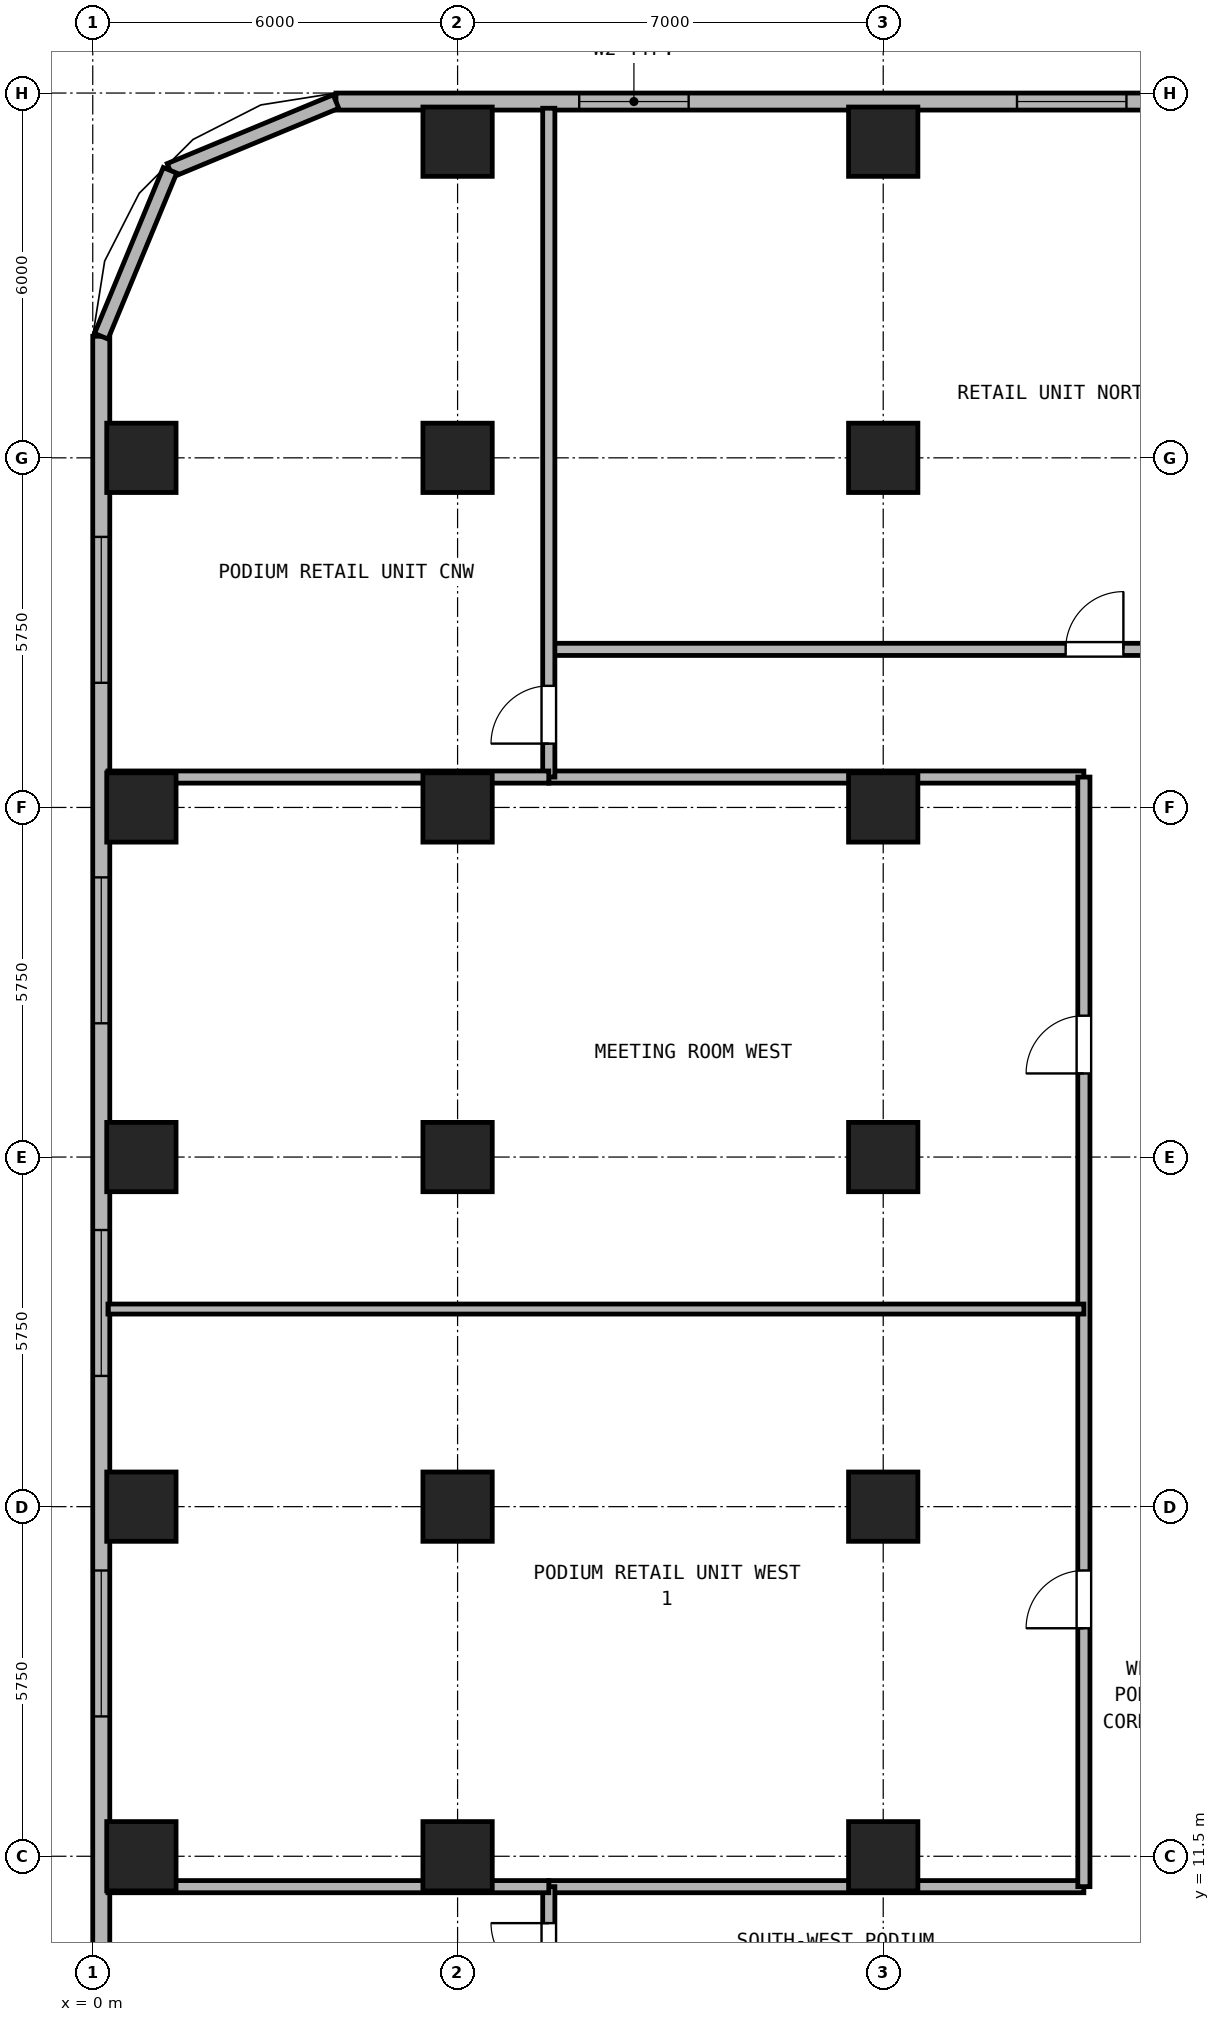
"""IFC4 building model, lengths in metres.
Left out: names, types, materials, properties, quantities, classifications, styles, units other than length and angle.
Written with IfcOpenShell. Run it as: python <this file> out.ifc"""

import sys

from ifc_helpers import new_model, si_unit, direction, frame, frame_2d, origin, origin_2d, place, context, subcontext, project, spatial, rectangle, hollow_rectangle, extrude, source, transform, mapped, element, fill, save


model = new_model("IFC4")
c1 = context("Model", 3, precision=1e-05, world=origin(), true_north=direction((0.0, 1.0)))
c2 = subcontext(c1, "Body", "Model", "MODEL_VIEW")
j1 = project(units=[si_unit("LENGTHUNIT", "METRE"), si_unit("PLANEANGLEUNIT", "RADIAN")], contexts=[c1])
p1 = place(None, origin())
s1 = spatial("IfcSite", under=j1, at=p1, CompositionType="ELEMENT")
p2 = place(p1, origin())
s2 = spatial("IfcBuilding", under=s1, at=p2, CompositionType="ELEMENT")
p3 = place(p2, frame((0.0, 0.0, 4.5)))
s3 = spatial("IfcBuildingStorey", under=s2, at=p3, CompositionType="ELEMENT", Elevation=4.5)
m1 = source(origin(), c2, "Body", "SweptSolid", [
    extrude(hollow_rectangle(XDim=1.14, YDim=1.14, WallThickness=0.07, at=origin_2d()), origin(), (0.0, 0.0, 1.0), 4.18),
])
for number, where, z_axis, x_axis in (
    (1, (6.0, 39.7, 0.0), (0.0, 0.0, 1.0), (1.0, 0.0, 0.0)),
    (2, (13.0, 39.7, 0.0), (0.0, 0.0, 1.0), (1.0, 0.0, 0.0)),
    (3, (0.8, 11.5, 0.0), (0.0, 0.0, 1.0), (1.0, 0.0, 0.0)),
    (4, (0.8, 17.25, 0.0), (0.0, 0.0, 1.0), (1.0, 0.0, 0.0)),
    (5, (0.8, 23.0, 0.0), (0.0, 0.0, 1.0), (1.0, 0.0, 0.0)),
    (6, (0.8, 28.75, 0.0), (0.0, 0.0, 1.0), (1.0, 0.0, 0.0)),
    (7, (0.8, 34.5, 0.0), (0.0, 0.0, 1.0), (1.0, 0.0, 0.0)),
    (8, (6.0, 11.5, 0.0), (0.0, 0.0, 1.0), (1.0, 0.0, 0.0)),
    (9, (6.0, 17.25, 0.0), (0.0, 0.0, 1.0), (1.0, 0.0, 0.0)),
    (10, (6.0, 23.0, 0.0), (0.0, 0.0, 1.0), (1.0, 0.0, 0.0)),
    (11, (6.0, 28.75, 0.0), (0.0, 0.0, 1.0), (1.0, 0.0, 0.0)),
    (12, (6.0, 34.5, 0.0), (0.0, 0.0, 1.0), (1.0, 0.0, 0.0)),
    (13, (13.0, 11.5, 0.0), (0.0, 0.0, 1.0), (1.0, 0.0, 0.0)),
    (14, (13.0, 17.25, 0.0), (0.0, 0.0, 1.0), (1.0, 0.0, 0.0)),
    (15, (13.0, 23.0, 0.0), (0.0, 0.0, 1.0), (1.0, 0.0, 0.0)),
    (16, (13.0, 28.75, 0.0), (0.0, 0.0, 1.0), (1.0, 0.0, 0.0)),
    (17, (13.0, 34.5, 0.0), (0.0, 0.0, 1.0), (1.0, 0.0, 0.0)),
):
    element("IfcColumn", number, at=place(p3, frame(where, z_axis=z_axis, x_axis=x_axis)), inside=s3, PredefinedType="COLUMN", context=c2, shape_type="MappedRepresentation", body=[
        mapped(m1, transform((0.0, 0.0, 0.0), x_axis=(1.0, 0.0, 0.0), y_axis=(0.0, 1.0, 0.0), z_axis=(0.0, 0.0, 1.0), scale=1.0)),
    ])
p4 = place(p3, frame((0.14, 4.0, 0.0), z_axis=(0.0, 0.0, 1.0), x_axis=(0.0, 1.0, 0.0)))
e18 = element("IfcWall", 18, at=p4, inside=s3, PredefinedType="SOLIDWALL", context=c2, shape_type="SweptSolid", body=[
    extrude(rectangle(XDim=32.5, YDim=0.28, at=frame_2d((16.25, 0.0))), origin(), (0.0, 0.0, 1.0), 4.18),
])
p5 = place(p4, frame((3.6, 0.0, 0.9)))
e19 = element("IfcOpeningElement", 19, at=p5, cuts=e18, PredefinedType="OPENING", context=c2, shape_type="SweptSolid", body=[
    extrude(rectangle(XDim=2.4, YDim=2.1, at=frame_2d((1.2, 1.05))), frame((0.0, 0.15, 0.0), z_axis=(0.0, -1.0, 0.0), x_axis=(1.0, 0.0, 0.0)), (0.0, 0.0, 1.0), 0.3),
])
p6 = place(p4, frame((9.8, 0.0, 0.9)))
e20 = element("IfcOpeningElement", 20, at=p6, cuts=e18, PredefinedType="OPENING", context=c2, shape_type="SweptSolid", body=[
    extrude(rectangle(XDim=2.4, YDim=2.1, at=frame_2d((1.2, 1.05))), frame((0.0, 0.15, 0.0), z_axis=(0.0, -1.0, 0.0), x_axis=(1.0, 0.0, 0.0)), (0.0, 0.0, 1.0), 0.3),
])
p7 = place(p4, frame((15.4, 0.0, 0.9)))
e21 = element("IfcOpeningElement", 21, at=p7, cuts=e18, PredefinedType="OPENING", context=c2, shape_type="SweptSolid", body=[
    extrude(rectangle(XDim=2.4, YDim=2.1, at=frame_2d((1.2, 1.05))), frame((0.0, 0.15, 0.0), z_axis=(0.0, -1.0, 0.0), x_axis=(1.0, 0.0, 0.0)), (0.0, 0.0, 1.0), 0.3),
])
p8 = place(p4, frame((21.2, 0.0, 0.9)))
e22 = element("IfcOpeningElement", 22, at=p8, cuts=e18, PredefinedType="OPENING", context=c2, shape_type="SweptSolid", body=[
    extrude(rectangle(XDim=2.4, YDim=2.1, at=frame_2d((1.2, 1.05))), frame((0.0, 0.15, 0.0), z_axis=(0.0, -1.0, 0.0), x_axis=(1.0, 0.0, 0.0)), (0.0, 0.0, 1.0), 0.3),
])
p9 = place(p4, frame((26.8, 0.0, 0.9)))
e23 = element("IfcOpeningElement", 23, at=p9, cuts=e18, PredefinedType="OPENING", context=c2, shape_type="SweptSolid", body=[
    extrude(rectangle(XDim=2.4, YDim=2.1, at=frame_2d((1.2, 1.05))), frame((0.0, 0.15, 0.0), z_axis=(0.0, -1.0, 0.0), x_axis=(1.0, 0.0, 0.0)), (0.0, 0.0, 1.0), 0.3),
])
p10 = place(p3, frame((4.0, 40.36, 0.0), z_axis=(0.0, 0.0, 1.0), x_axis=(1.0, 0.0, 0.0)))
e24 = element("IfcWall", 24, at=p10, inside=s3, PredefinedType="SOLIDWALL", context=c2, shape_type="SweptSolid", body=[
    extrude(rectangle(XDim=39.0, YDim=0.28, at=frame_2d((19.5, 0.0))), origin(), (0.0, 0.0, 1.0), 4.18),
])
p11 = place(p10, frame((4.0, 0.0, 0.9)))
e25 = element("IfcOpeningElement", 25, at=p11, cuts=e24, PredefinedType="OPENING", context=c2, shape_type="SweptSolid", body=[
    extrude(rectangle(XDim=1.8, YDim=2.1, at=frame_2d((0.9, 1.05))), frame((0.0, 0.15, 0.0), z_axis=(0.0, -1.0, 0.0), x_axis=(1.0, 0.0, 0.0)), (0.0, 0.0, 1.0), 0.3),
])
p12 = place(p10, frame((11.2, 0.0, 0.9)))
e26 = element("IfcOpeningElement", 26, at=p12, cuts=e24, PredefinedType="OPENING", context=c2, shape_type="SweptSolid", body=[
    extrude(rectangle(XDim=1.8, YDim=2.1, at=frame_2d((0.9, 1.05))), frame((0.0, 0.15, 0.0), z_axis=(0.0, -1.0, 0.0), x_axis=(1.0, 0.0, 0.0)), (0.0, 0.0, 1.0), 0.3),
])
p13 = place(p10, frame((19.5, 0.0, 0.9)))
e27 = element("IfcOpeningElement", 27, at=p13, cuts=e24, PredefinedType="OPENING", context=c2, shape_type="SweptSolid", body=[
    extrude(rectangle(XDim=1.8, YDim=2.1, at=frame_2d((0.9, 1.05))), frame((0.0, 0.15, 0.0), z_axis=(0.0, -1.0, 0.0), x_axis=(1.0, 0.0, 0.0)), (0.0, 0.0, 1.0), 0.3),
])
p14 = place(p10, frame((26.2, 0.0, 0.9)))
e28 = element("IfcOpeningElement", 28, at=p14, cuts=e24, PredefinedType="OPENING", context=c2, shape_type="SweptSolid", body=[
    extrude(rectangle(XDim=1.8, YDim=2.1, at=frame_2d((0.9, 1.05))), frame((0.0, 0.15, 0.0), z_axis=(0.0, -1.0, 0.0), x_axis=(1.0, 0.0, 0.0)), (0.0, 0.0, 1.0), 0.3),
])
p15 = place(p10, frame((32.8, 0.0, 0.9)))
e29 = element("IfcOpeningElement", 29, at=p15, cuts=e24, PredefinedType="OPENING", context=c2, shape_type="SweptSolid", body=[
    extrude(rectangle(XDim=1.8, YDim=2.1, at=frame_2d((0.9, 1.05))), frame((0.0, 0.15, 0.0), z_axis=(0.0, -1.0, 0.0), x_axis=(1.0, 0.0, 0.0)), (0.0, 0.0, 1.0), 0.3),
])
for number, where, z_axis, x_axis in (
    (30, (4.0, 40.36, 0.0), (0.0, 0.0, 1.0), (-0.924, -0.383, 0.0)),
    (31, (1.271, 39.229, 0.0), (0.0, 0.0, 1.0), (-0.383, -0.924, 0.0)),
):
    element("IfcWall", number, at=place(p3, frame(where, z_axis=z_axis, x_axis=x_axis)), inside=s3, PredefinedType="SOLIDWALL", context=c2, shape_type="SweptSolid", body=[
        extrude(rectangle(XDim=2.954, YDim=0.24, at=frame_2d((1.477, 0.0))), origin(), (0.0, 0.0, 1.0), 4.18),
    ])
p16 = place(p3, frame((7.5, 31.35, 0.0), z_axis=(0.0, 0.0, 1.0), x_axis=(1.0, 0.0, 0.0)))
e32 = element("IfcWall", 32, at=p16, inside=s3, PredefinedType="PARTITIONING", context=c2, shape_type="SweptSolid", body=[
    extrude(rectangle(XDim=32.0, YDim=0.2, at=frame_2d((16.0, 0.0))), origin(), (0.0, 0.0, 1.0), 4.18),
])
p17 = place(p16, frame((8.5, 0.0, 0.0)))
e33 = element("IfcOpeningElement", 33, at=p17, cuts=e32, PredefinedType="OPENING", context=c2, shape_type="SweptSolid", body=[
    extrude(rectangle(XDim=0.95, YDim=2.15, at=frame_2d((0.475, 1.075))), frame((0.0, 0.11, 0.0), z_axis=(0.0, -1.0, 0.0), x_axis=(1.0, 0.0, 0.0)), (0.0, 0.0, 1.0), 0.22),
])
p18 = place(p16, frame((24.5, 0.0, 0.0)))
e34 = element("IfcOpeningElement", 34, at=p18, cuts=e32, PredefinedType="OPENING", context=c2, shape_type="SweptSolid", body=[
    extrude(rectangle(XDim=0.95, YDim=2.15, at=frame_2d((0.475, 1.075))), frame((0.0, 0.11, 0.0), z_axis=(0.0, -1.0, 0.0), x_axis=(1.0, 0.0, 0.0)), (0.0, 0.0, 1.0), 0.22),
])
for number, where, z_axis, x_axis in (
    (35, (7.5, 11.0, 0.0), (0.0, 0.0, 1.0), (1.0, 0.0, 0.0)),
    (36, (7.5, 29.25, 0.0), (0.0, 0.0, 1.0), (1.0, 0.0, 0.0)),
):
    element("IfcWall", number, at=place(p3, frame(where, z_axis=z_axis, x_axis=x_axis)), inside=s3, PredefinedType="PARTITIONING", context=c2, shape_type="SweptSolid", body=[
        extrude(rectangle(XDim=8.8, YDim=0.2, at=frame_2d((4.4, 0.0))), origin(), (0.0, 0.0, 1.0), 4.18),
    ])
p19 = place(p3, frame((16.3, 11.0, 0.0), z_axis=(0.0, 0.0, 1.0), x_axis=(0.0, 1.0, 0.0)))
e37 = element("IfcWall", 37, at=p19, inside=s3, PredefinedType="PARTITIONING", context=c2, shape_type="SweptSolid", body=[
    extrude(rectangle(XDim=18.25, YDim=0.2, at=frame_2d((9.125, 0.0))), origin(), (0.0, 0.0, 1.0), 4.18),
])
p20 = place(p19, frame((4.25, 0.0, 0.0)))
e38 = element("IfcOpeningElement", 38, at=p20, cuts=e37, PredefinedType="OPENING", context=c2, shape_type="SweptSolid", body=[
    extrude(rectangle(XDim=0.95, YDim=2.15, at=frame_2d((0.475, 1.075))), frame((0.0, 0.11, 0.0), z_axis=(0.0, -1.0, 0.0), x_axis=(1.0, 0.0, 0.0)), (0.0, 0.0, 1.0), 0.22),
])
p21 = place(p19, frame((13.375, 0.0, 0.0)))
e39 = element("IfcOpeningElement", 39, at=p21, cuts=e37, PredefinedType="OPENING", context=c2, shape_type="SweptSolid", body=[
    extrude(rectangle(XDim=0.95, YDim=2.15, at=frame_2d((0.475, 1.075))), frame((0.0, 0.11, 0.0), z_axis=(0.0, -1.0, 0.0), x_axis=(1.0, 0.0, 0.0)), (0.0, 0.0, 1.0), 0.22),
])
p22 = place(p3, frame((7.5, 0.25, 0.0), z_axis=(0.0, 0.0, 1.0), x_axis=(0.0, 1.0, 0.0)))
e40 = element("IfcWall", 40, at=p22, inside=s3, PredefinedType="PARTITIONING", context=c2, shape_type="SweptSolid", body=[
    extrude(rectangle(XDim=10.75, YDim=0.2, at=frame_2d((5.375, 0.0))), origin(), (0.0, 0.0, 1.0), 4.18),
])
p23 = place(p22, frame((9.2, 0.0, 0.0)))
e41 = element("IfcOpeningElement", 41, at=p23, cuts=e40, PredefinedType="OPENING", context=c2, shape_type="SweptSolid", body=[
    extrude(rectangle(XDim=0.95, YDim=2.15, at=frame_2d((0.475, 1.075))), frame((0.0, 0.11, 0.0), z_axis=(0.0, -1.0, 0.0), x_axis=(1.0, 0.0, 0.0)), (0.0, 0.0, 1.0), 0.22),
])
p24 = place(p3, frame((7.5, 29.25, 0.0), z_axis=(0.0, 0.0, 1.0), x_axis=(0.0, 1.0, 0.0)))
e42 = element("IfcWall", 42, at=p24, inside=s3, PredefinedType="PARTITIONING", context=c2, shape_type="SweptSolid", body=[
    extrude(rectangle(XDim=11.0, YDim=0.2, at=frame_2d((5.5, 0.0))), origin(), (0.0, 0.0, 1.0), 4.18),
])
p25 = place(p24, frame((0.55, 0.0, 0.0)))
e43 = element("IfcOpeningElement", 43, at=p25, cuts=e42, PredefinedType="OPENING", context=c2, shape_type="SweptSolid", body=[
    extrude(rectangle(XDim=0.95, YDim=2.15, at=frame_2d((0.475, 1.075))), frame((0.0, 0.11, 0.0), z_axis=(0.0, -1.0, 0.0), x_axis=(1.0, 0.0, 0.0)), (0.0, 0.0, 1.0), 0.22),
])
for number, where, z_axis, x_axis in (
    (44, (0.25, 11.0, 0.0), (0.0, 0.0, 1.0), (1.0, 0.0, 0.0)),
    (45, (0.25, 29.25, 0.0), (0.0, 0.0, 1.0), (1.0, 0.0, 0.0)),
):
    element("IfcWall", number, at=place(p3, frame(where, z_axis=z_axis, x_axis=x_axis)), inside=s3, PredefinedType="PARTITIONING", context=c2, shape_type="SweptSolid", body=[
        extrude(rectangle(XDim=7.25, YDim=0.2, at=frame_2d((3.625, 0.0))), origin(), (0.0, 0.0, 1.0), 4.18),
    ])
p26 = place(p3, frame((0.25, 20.5, 0.0), z_axis=(0.0, 0.0, 1.0), x_axis=(1.0, 0.0, 0.0)))
e46 = element("IfcWall", 46, at=p26, inside=s3, PredefinedType="PARTITIONING", context=c2, shape_type="SweptSolid", body=[
    extrude(rectangle(XDim=16.05, YDim=0.165, at=frame_2d((8.025, 0.0))), origin(), (0.0, 0.0, 1.0), 4.18),
])
p27 = place(p6, origin())
e47 = element("IfcWindow", 47, at=p27, inside=s3, PartitioningType="SINGLE_PANEL", PredefinedType="WINDOW", context=c2, shape_type="SweptSolid", body=[
    extrude(rectangle(XDim=2.4, YDim=2.1, at=frame_2d((1.2, 1.05))), frame((0.0, 0.03, 0.0), z_axis=(0.0, -1.0, 0.0), x_axis=(1.0, 0.0, 0.0)), (0.0, 0.0, 1.0), 0.06),
])
fill(e20, e47)
p28 = place(p7, origin())
e48 = element("IfcWindow", 48, at=p28, inside=s3, PartitioningType="SINGLE_PANEL", PredefinedType="WINDOW", context=c2, shape_type="SweptSolid", body=[
    extrude(rectangle(XDim=2.4, YDim=2.1, at=frame_2d((1.2, 1.05))), frame((0.0, 0.03, 0.0), z_axis=(0.0, -1.0, 0.0), x_axis=(1.0, 0.0, 0.0)), (0.0, 0.0, 1.0), 0.06),
])
fill(e21, e48)
p29 = place(p8, origin())
e49 = element("IfcWindow", 49, at=p29, inside=s3, PartitioningType="SINGLE_PANEL", PredefinedType="WINDOW", context=c2, shape_type="SweptSolid", body=[
    extrude(rectangle(XDim=2.4, YDim=2.1, at=frame_2d((1.2, 1.05))), frame((0.0, 0.03, 0.0), z_axis=(0.0, -1.0, 0.0), x_axis=(1.0, 0.0, 0.0)), (0.0, 0.0, 1.0), 0.06),
])
fill(e22, e49)
p30 = place(p9, origin())
e50 = element("IfcWindow", 50, at=p30, inside=s3, PartitioningType="SINGLE_PANEL", PredefinedType="WINDOW", context=c2, shape_type="SweptSolid", body=[
    extrude(rectangle(XDim=2.4, YDim=2.1, at=frame_2d((1.2, 1.05))), frame((0.0, 0.03, 0.0), z_axis=(0.0, -1.0, 0.0), x_axis=(1.0, 0.0, 0.0)), (0.0, 0.0, 1.0), 0.06),
])
fill(e23, e50)
p31 = place(p11, origin())
e51 = element("IfcWindow", 51, at=p31, inside=s3, PartitioningType="SINGLE_PANEL", PredefinedType="WINDOW", context=c2, shape_type="SweptSolid", body=[
    extrude(rectangle(XDim=1.8, YDim=2.1, at=frame_2d((0.9, 1.05))), frame((0.0, 0.03, 0.0), z_axis=(0.0, -1.0, 0.0), x_axis=(1.0, 0.0, 0.0)), (0.0, 0.0, 1.0), 0.06),
])
fill(e25, e51)
p32 = place(p12, origin())
e52 = element("IfcWindow", 52, at=p32, inside=s3, PartitioningType="SINGLE_PANEL", PredefinedType="WINDOW", context=c2, shape_type="SweptSolid", body=[
    extrude(rectangle(XDim=1.8, YDim=2.1, at=frame_2d((0.9, 1.05))), frame((0.0, 0.03, 0.0), z_axis=(0.0, -1.0, 0.0), x_axis=(1.0, 0.0, 0.0)), (0.0, 0.0, 1.0), 0.06),
])
fill(e26, e52)
p33 = place(p17, origin())
e53 = element("IfcDoor", 53, at=p33, inside=s3, OperationType="SINGLE_SWING_RIGHT", PredefinedType="DOOR", context=c2, shape_type="SweptSolid", body=[
    extrude(rectangle(XDim=0.95, YDim=2.15, at=frame_2d((0.475, 1.075))), frame((0.0, 0.025, 0.0), z_axis=(0.0, -1.0, 0.0), x_axis=(1.0, 0.0, 0.0)), (0.0, 0.0, 1.0), 0.05),
])
fill(e33, e53)
p34 = place(p23, frame((0.95, 0.0, 0.0), z_axis=(0.0, 0.0, 1.0), x_axis=(-1.0, 0.0, 0.0)))
e54 = element("IfcDoor", 54, at=p34, inside=s3, OperationType="SINGLE_SWING_RIGHT", PredefinedType="DOOR", context=c2, shape_type="SweptSolid", body=[
    extrude(rectangle(XDim=0.95, YDim=2.15, at=frame_2d((0.475, 1.075))), frame((0.0, 0.025, 0.0), z_axis=(0.0, -1.0, 0.0), x_axis=(1.0, 0.0, 0.0)), (0.0, 0.0, 1.0), 0.05),
])
fill(e41, e54)
p35 = place(p25, frame((0.95, 0.0, 0.0), z_axis=(0.0, 0.0, 1.0), x_axis=(-1.0, 0.0, 0.0)))
e55 = element("IfcDoor", 55, at=p35, inside=s3, OperationType="SINGLE_SWING_LEFT", PredefinedType="DOOR", context=c2, shape_type="SweptSolid", body=[
    extrude(rectangle(XDim=0.95, YDim=2.15, at=frame_2d((0.475, 1.075))), frame((0.0, 0.025, 0.0), z_axis=(0.0, -1.0, 0.0), x_axis=(1.0, 0.0, 0.0)), (0.0, 0.0, 1.0), 0.05),
])
fill(e43, e55)
p36 = place(p20, frame((0.95, 0.0, 0.0), z_axis=(0.0, 0.0, 1.0), x_axis=(-1.0, 0.0, 0.0)))
e56 = element("IfcDoor", 56, at=p36, inside=s3, OperationType="SINGLE_SWING_LEFT", PredefinedType="DOOR", context=c2, shape_type="SweptSolid", body=[
    extrude(rectangle(XDim=0.95, YDim=2.15, at=frame_2d((0.475, 1.075))), frame((0.0, 0.025, 0.0), z_axis=(0.0, -1.0, 0.0), x_axis=(1.0, 0.0, 0.0)), (0.0, 0.0, 1.0), 0.05),
])
fill(e38, e56)
p37 = place(p21, frame((0.95, 0.0, 0.0), z_axis=(0.0, 0.0, 1.0), x_axis=(-1.0, 0.0, 0.0)))
e57 = element("IfcDoor", 57, at=p37, inside=s3, OperationType="SINGLE_SWING_LEFT", PredefinedType="DOOR", context=c2, shape_type="SweptSolid", body=[
    extrude(rectangle(XDim=0.95, YDim=2.15, at=frame_2d((0.475, 1.075))), frame((0.0, 0.025, 0.0), z_axis=(0.0, -1.0, 0.0), x_axis=(1.0, 0.0, 0.0)), (0.0, 0.0, 1.0), 0.05),
])
fill(e39, e57)
save(model, sys.argv[1])
